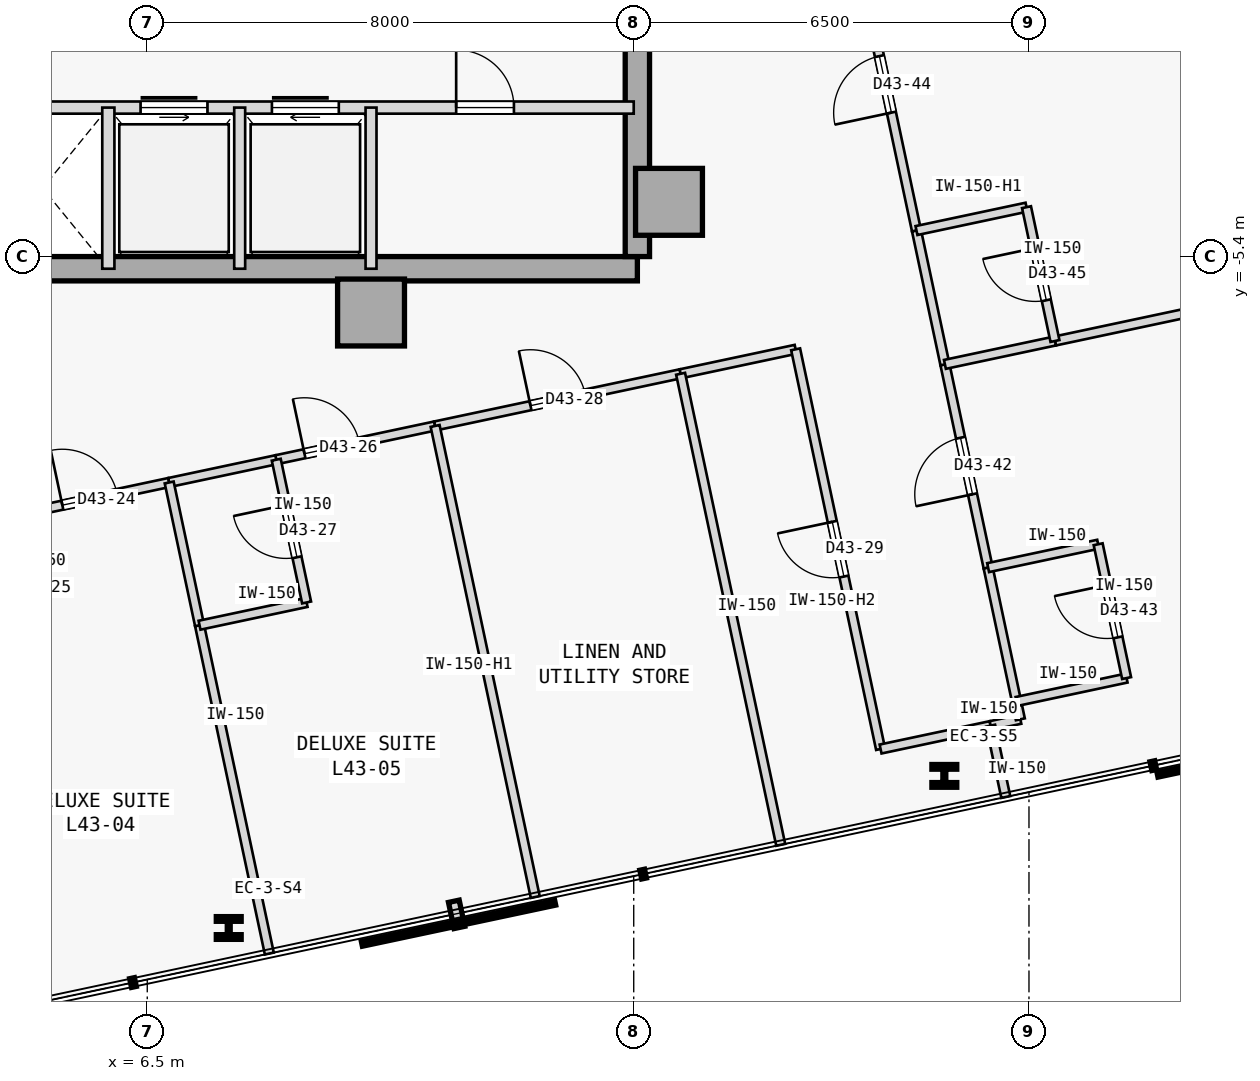
"""IFC4 building model, lengths in metres.
Left out: names, types, materials, properties, quantities, classifications, styles, units other than length and angle.
Written with IfcOpenShell. Run it as: python <this file> out.ifc"""

import sys

from ifc_helpers import new_model, si_unit, direction, frame, frame_2d, origin, origin_2d, place, context, subcontext, project, spatial, rectangle, i_section, extrude, element, fill, save


model = new_model("IFC4")
c1 = context("Model", 3, precision=1e-05, world=origin(), true_north=direction((0.0, 1.0)))
c2 = subcontext(c1, "Body", "Model", "MODEL_VIEW")
j1 = project(units=[si_unit("LENGTHUNIT", "METRE"), si_unit("PLANEANGLEUNIT", "RADIAN")], contexts=[c1])
p1 = place(None, origin())
s1 = spatial("IfcSite", under=j1, at=p1, CompositionType="ELEMENT")
p2 = place(p1, origin())
s2 = spatial("IfcBuilding", under=s1, at=p2, CompositionType="ELEMENT")
p3 = place(p2, frame((0.0, 0.0, 168.4)))
s3 = spatial("IfcBuildingStorey", under=s2, at=p3, CompositionType="ELEMENT", Elevation=168.4)
for number, where, z_axis, x_axis in (
    (1, (15.08, -4.5, 0.0), (0.0, 0.0, 1.0), (1.0, 0.0, 0.0)),
    (2, (10.18, -6.32, 0.0), (0.0, 0.0, 1.0), (1.0, 0.0, 0.0)),
):
    element("IfcColumn", number, at=place(p3, frame(where, z_axis=z_axis, x_axis=x_axis)), inside=s3, PredefinedType="COLUMN", context=c2, shape_type="SweptSolid", body=[
        extrude(rectangle(XDim=1.1, YDim=1.1, at=origin_2d()), origin(), (0.0, 0.0, 1.0), 3.4),
    ])
p4 = place(p3, frame((3.7, -5.6, 0.0), z_axis=(0.0, 0.0, 1.0), x_axis=(1.0, 0.0, 0.0)))
e3 = element("IfcWall", 3, at=p4, inside=s3, PredefinedType="SHEAR", context=c2, shape_type="SweptSolid", body=[
    extrude(rectangle(XDim=10.86, YDim=0.4, at=frame_2d((5.43, 0.0))), origin(), (0.0, 0.0, 1.0), 3.175),
])
p5 = place(p3, frame((14.56, -5.4, 0.0), z_axis=(0.0, 0.0, 1.0), x_axis=(0.0, 1.0, 0.0)))
e4 = element("IfcWall", 4, at=p5, inside=s3, PredefinedType="SHEAR", context=c2, shape_type="SweptSolid", body=[
    extrude(rectangle(XDim=10.8, YDim=0.4, at=frame_2d((5.4, 0.0))), origin(), (0.0, 0.0, 1.0), 3.175),
])
for number, where, z_axis, x_axis in (
    (5, (7.84, -16.441, 0.0), (0.0, 0.0, 1.0), (1.0, 0.0, 0.0)),
    (6, (19.608, -13.94, 0.0), (0.0, 0.0, 1.0), (1.0, 0.0, 0.0)),
):
    element("IfcColumn", number, at=place(p3, frame(where, z_axis=z_axis, x_axis=x_axis)), inside=s3, PredefinedType="COLUMN", context=c2, shape_type="SweptSolid", body=[
        extrude(i_section(OverallWidth=0.409, OverallDepth=0.374, WebThickness=0.048, FlangeThickness=0.077, FilletRadius=0.015, at=origin_2d()), origin(), (0.0, 0.0, 1.0), 3.4),
    ])
p6 = place(p3, frame((3.7, -2.95, 0.0), z_axis=(0.0, 0.0, 1.0), x_axis=(1.0, 0.0, 0.0)))
e7 = element("IfcWall", 7, at=p6, inside=s3, PredefinedType="STANDARD", context=c2, shape_type="SweptSolid", body=[
    extrude(rectangle(XDim=10.8, YDim=0.2, at=frame_2d((5.4, 0.0))), origin(), (0.0, 0.0, 1.0), 3.175),
])
p7 = place(p6, frame((2.69, 0.0, 0.0)))
e8 = element("IfcOpeningElement", 8, at=p7, cuts=e7, PredefinedType="OPENING", context=c2, shape_type="SweptSolid", body=[
    extrude(rectangle(XDim=1.1, YDim=2.15, at=frame_2d((0.55, 1.075))), frame((0.0, 0.11, 0.0), z_axis=(0.0, -1.0, 0.0), x_axis=(1.0, 0.0, 0.0)), (0.0, 0.0, 1.0), 0.22),
])
p8 = place(p6, frame((4.85, 0.0, 0.0)))
e9 = element("IfcOpeningElement", 9, at=p8, cuts=e7, PredefinedType="OPENING", context=c2, shape_type="SweptSolid", body=[
    extrude(rectangle(XDim=1.1, YDim=2.15, at=frame_2d((0.55, 1.075))), frame((0.0, 0.11, 0.0), z_axis=(0.0, -1.0, 0.0), x_axis=(1.0, 0.0, 0.0)), (0.0, 0.0, 1.0), 0.22),
])
p9 = place(p6, frame((7.88, 0.0, 0.0)))
e10 = element("IfcOpeningElement", 10, at=p9, cuts=e7, PredefinedType="OPENING", context=c2, shape_type="SweptSolid", body=[
    extrude(rectangle(XDim=0.95, YDim=2.15, at=frame_2d((0.475, 1.075))), frame((0.0, 0.11, 0.0), z_axis=(0.0, -1.0, 0.0), x_axis=(1.0, 0.0, 0.0)), (0.0, 0.0, 1.0), 0.22),
])
p10 = place(p3, frame((5.86, -5.6, 0.0), z_axis=(0.0, 0.0, 1.0), x_axis=(0.0, 1.0, 0.0)))
e11 = element("IfcWall", 11, at=p10, inside=s3, PredefinedType="STANDARD", context=c2, shape_type="SweptSolid", body=[
    extrude(rectangle(XDim=2.65, YDim=0.2, at=frame_2d((1.325, 0.0))), origin(), (0.0, 0.0, 1.0), 3.175),
])
for number, where, z_axis, x_axis in (
    (12, (10.18, -5.6, 0.0), (0.0, 0.0, 1.0), (0.0, 1.0, 0.0)),
    (13, (8.02, -5.6, 0.0), (0.0, 0.0, 1.0), (0.0, 1.0, 0.0)),
):
    element("IfcWall", number, at=place(p3, frame(where, z_axis=z_axis, x_axis=x_axis)), inside=s3, PredefinedType="STANDARD", context=c2, shape_type="SweptSolid", body=[
        extrude(rectangle(XDim=2.65, YDim=0.18, at=frame_2d((1.325, 0.0))), origin(), (0.0, 0.0, 1.0), 3.175),
    ])
p11 = place(p3, frame((4.247, -9.67, 0.0), z_axis=(0.0, 0.0, 1.0), x_axis=(0.978155367406, 0.207875148141, 0.0)))
e14 = element("IfcWall", 14, at=p11, inside=s3, PredefinedType="PARTITIONING", context=c2, shape_type="SweptSolid", body=[
    extrude(rectangle(XDim=2.672, YDim=0.15, at=frame_2d((1.336, 0.0))), origin(), (0.0, 0.0, 1.0), 3.175),
])
p12 = place(p11, frame((0.876, 0.0, 0.0)))
e15 = element("IfcOpeningElement", 15, at=p12, cuts=e14, PredefinedType="OPENING", context=c2, shape_type="SweptSolid", body=[
    extrude(rectangle(XDim=0.92, YDim=2.15, at=frame_2d((0.46, 1.075))), frame((0.0, 0.085, 0.0), z_axis=(0.0, -1.0, 0.0), x_axis=(1.0, 0.0, 0.0)), (0.0, 0.0, 1.0), 0.17),
])
p13 = place(p3, frame((8.621, -8.741, 0.0), z_axis=(0.0, 0.0, 1.0), x_axis=(0.978139565144, 0.207949491702, 0.0)))
e16 = element("IfcWall", 16, at=p13, inside=s3, PredefinedType="PARTITIONING", context=c2, shape_type="SweptSolid", body=[
    extrude(rectangle(XDim=2.671, YDim=0.15, at=frame_2d((1.335, 0.0))), origin(), (0.0, 0.0, 1.0), 3.175),
])
p14 = place(p13, frame((0.475, 0.0, 0.0)))
e17 = element("IfcOpeningElement", 17, at=p14, cuts=e16, PredefinedType="OPENING", context=c2, shape_type="SweptSolid", body=[
    extrude(rectangle(XDim=0.92, YDim=2.15, at=frame_2d((0.46, 1.075))), frame((0.0, 0.085, 0.0), z_axis=(0.0, -1.0, 0.0), x_axis=(1.0, 0.0, 0.0)), (0.0, 0.0, 1.0), 0.17),
])
p15 = place(p3, frame((6.861, -9.115, 0.0), z_axis=(0.0, 0.0, 1.0), x_axis=(0.978146440129, 0.207917150959, 0.0)))
e18 = element("IfcWall", 18, at=p15, inside=s3, PredefinedType="PARTITIONING", context=c2, shape_type="SweptSolid", body=[
    extrude(rectangle(XDim=1.8, YDim=0.15, at=frame_2d((0.9, 0.0))), origin(), (0.0, 0.0, 1.0), 3.175),
])
p16 = place(p3, frame((11.234, -8.185, 0.0), z_axis=(0.0, 0.0, 1.0), x_axis=(0.978155092113, 0.207876443525, 0.0)))
e19 = element("IfcWall", 19, at=p16, inside=s3, PredefinedType="PARTITIONING", context=c2, shape_type="SweptSolid", body=[
    extrude(rectangle(XDim=4.127, YDim=0.15, at=frame_2d((2.063, 0.0))), origin(), (0.0, 0.0, 1.0), 3.175),
])
p17 = place(p16, frame((1.604, 0.0, 0.0)))
e20 = element("IfcOpeningElement", 20, at=p17, cuts=e19, PredefinedType="OPENING", context=c2, shape_type="SweptSolid", body=[
    extrude(rectangle(XDim=0.92, YDim=2.15, at=frame_2d((0.46, 1.075))), frame((0.0, 0.085, 0.0), z_axis=(0.0, -1.0, 0.0), x_axis=(1.0, 0.0, 0.0)), (0.0, 0.0, 1.0), 0.17),
])
p18 = place(p3, frame((15.271, -7.327, 0.0), z_axis=(0.0, 0.0, 1.0), x_axis=(0.978150188204, 0.207899517354, 0.0)))
e21 = element("IfcWall", 21, at=p18, inside=s3, PredefinedType="PARTITIONING", context=c2, shape_type="SweptSolid", body=[
    extrude(rectangle(XDim=1.934, YDim=0.15, at=frame_2d((0.967, 0.0))), origin(), (0.0, 0.0, 1.0), 3.175),
])
p19 = place(p3, frame((18.56, -13.498, 0.0), z_axis=(0.0, 0.0, 1.0), x_axis=(-0.207888737749, 0.978152479278, 0.0)))
e22 = element("IfcWall", 22, at=p19, inside=s3, PredefinedType="PARTITIONING", context=c2, shape_type="SweptSolid", body=[
    extrude(rectangle(XDim=6.72, YDim=0.15, at=frame_2d((3.36, 0.0))), origin(), (0.0, 0.0, 1.0), 2.575),
])
p20 = place(p19, frame((2.9, 0.0, 0.0)))
e23 = element("IfcOpeningElement", 23, at=p20, cuts=e22, PredefinedType="OPENING", context=c2, shape_type="SweptSolid", body=[
    extrude(rectangle(XDim=0.92, YDim=2.15, at=frame_2d((0.46, 1.075))), frame((0.0, 0.085, 0.0), z_axis=(0.0, -1.0, 0.0), x_axis=(1.0, 0.0, 0.0)), (0.0, 0.0, 1.0), 0.17),
])
p21 = place(p3, frame((18.56, -13.498, 0.0), z_axis=(0.0, 0.0, 1.0), x_axis=(0.978160192495, 0.207852442415, 0.0)))
e24 = element("IfcWall", 24, at=p21, inside=s3, PredefinedType="PARTITIONING", context=c2, shape_type="SweptSolid", body=[
    extrude(rectangle(XDim=1.85, YDim=0.15, at=frame_2d((0.925, 0.0))), origin(), (0.0, 0.0, 1.0), 3.175),
])
p22 = place(p3, frame((20.369, -13.114, 0.0), z_axis=(0.0, 0.0, 1.0), x_axis=(0.978143962546, 0.207928806409, 0.0)))
e25 = element("IfcWall", 25, at=p22, inside=s3, PredefinedType="PARTITIONING", context=c2, shape_type="SweptSolid", body=[
    extrude(rectangle(XDim=0.5, YDim=0.15, at=frame_2d((0.25, 0.0))), origin(), (0.0, 0.0, 1.0), 3.175),
])
p23 = place(p3, frame((20.858, -13.01, 0.0), z_axis=(0.0, 0.0, 1.0), x_axis=(-0.208306395052, 0.978063620518, 0.0)))
e26 = element("IfcWall", 26, at=p23, inside=s3, PredefinedType="PARTITIONING", context=c2, shape_type="SweptSolid", body=[
    extrude(rectangle(XDim=0.3, YDim=0.15, at=frame_2d((0.15, 0.0))), origin(), (0.0, 0.0, 1.0), 3.175),
])
p24 = place(p3, frame((20.328, -10.515, 0.0), z_axis=(0.0, 0.0, 1.0), x_axis=(-0.207918572776, 0.978146137903, 0.0)))
e27 = element("IfcWall", 27, at=p24, inside=s3, PredefinedType="PARTITIONING", context=c2, shape_type="SweptSolid", body=[
    extrude(rectangle(XDim=3.417, YDim=0.15, at=frame_2d((1.708, 0.0))), origin(), (0.0, 0.0, 1.0), 3.175),
])
p25 = place(p24, frame((1.233, 0.0, 0.0)))
e28 = element("IfcOpeningElement", 28, at=p25, cuts=e27, PredefinedType="OPENING", context=c2, shape_type="SweptSolid", body=[
    extrude(rectangle(XDim=0.95, YDim=2.15, at=frame_2d((0.475, 1.075))), frame((0.0, 0.085, 0.0), z_axis=(0.0, -1.0, 0.0), x_axis=(1.0, 0.0, 0.0)), (0.0, 0.0, 1.0), 0.17),
])
p26 = place(p3, frame((20.796, -12.716, 0.0), z_axis=(0.0, 0.0, 1.0), x_axis=(-0.207891197838, 0.978151956427, 0.0)))
e29 = element("IfcWall", 29, at=p26, inside=s3, PredefinedType="PARTITIONING", context=c2, shape_type="SweptSolid", body=[
    extrude(rectangle(XDim=2.25, YDim=0.15, at=frame_2d((1.125, 0.0))), origin(), (0.0, 0.0, 1.0), 3.175),
])
p27 = place(p3, frame((19.15, -4.972, 0.0), z_axis=(0.0, 0.0, 1.0), x_axis=(-0.207934781332, 0.978142692409, 0.0)))
e30 = element("IfcWall", 30, at=p27, inside=s3, PredefinedType="PARTITIONING", context=c2, shape_type="SweptSolid", body=[
    extrude(rectangle(XDim=4.916, YDim=0.15, at=frame_2d((2.458, 0.0))), origin(), (0.0, 0.0, 1.0), 3.175),
])
p28 = place(p27, frame((1.983, 0.0, 0.0)))
e31 = element("IfcOpeningElement", 31, at=p28, cuts=e30, PredefinedType="OPENING", context=c2, shape_type="SweptSolid", body=[
    extrude(rectangle(XDim=0.95, YDim=2.15, at=frame_2d((0.475, 1.075))), frame((0.0, 0.085, 0.0), z_axis=(0.0, -1.0, 0.0), x_axis=(1.0, 0.0, 0.0)), (0.0, 0.0, 1.0), 0.17),
])
p29 = place(p3, frame((19.618, -7.173, 0.0), z_axis=(0.0, 0.0, 1.0), x_axis=(-0.207913264065, 0.978147266328, 0.0)))
e32 = element("IfcWall", 32, at=p29, inside=s3, PredefinedType="PARTITIONING", context=c2, shape_type="SweptSolid", body=[
    extrude(rectangle(XDim=2.25, YDim=0.15, at=frame_2d((1.125, 0.0))), origin(), (0.0, 0.0, 1.0), 3.175),
])
p30 = place(p3, frame((8.507, -16.862, 0.0), z_axis=(0.0, 0.0, 1.0), x_axis=(-0.20791588359, 0.978146709523, 0.0)))
e33 = element("IfcWall", 33, at=p30, inside=s3, PredefinedType="PARTITIONING", context=c2, shape_type="SweptSolid", body=[
    extrude(rectangle(XDim=5.52, YDim=0.15, at=frame_2d((2.76, 0.0))), origin(), (0.0, 0.0, 1.0), 3.175),
])
p31 = place(p3, frame((7.36, -11.462, 0.0), z_axis=(0.0, 0.0, 1.0), x_axis=(-0.207937840262, 0.978142042133, 0.0)))
e34 = element("IfcWall", 34, at=p31, inside=s3, PredefinedType="PARTITIONING", context=c2, shape_type="SweptSolid", body=[
    extrude(rectangle(XDim=2.4, YDim=0.15, at=frame_2d((1.2, 0.0))), origin(), (0.0, 0.0, 1.0), 3.175),
])
p32 = place(p3, frame((7.36, -11.462, 0.0), z_axis=(0.0, 0.0, 1.0), x_axis=(0.978174015353, 0.207787380965, 0.0)))
e35 = element("IfcWall", 35, at=p32, inside=s3, PredefinedType="PARTITIONING", context=c2, shape_type="SweptSolid", body=[
    extrude(rectangle(XDim=1.8, YDim=0.15, at=frame_2d((0.9, 0.0))), origin(), (0.0, 0.0, 1.0), 3.175),
])
p33 = place(p3, frame((9.12, -11.088, 0.0), z_axis=(0.0, 0.0, 1.0), x_axis=(-0.207917150959, 0.978146440129, 0.0)))
e36 = element("IfcWall", 36, at=p33, inside=s3, PredefinedType="PARTITIONING", context=c2, shape_type="SweptSolid", body=[
    extrude(rectangle(XDim=2.4, YDim=0.15, at=frame_2d((1.2, 0.0))), origin(), (0.0, 0.0, 1.0), 3.175),
])
p34 = place(p33, frame((0.76, 0.0, 0.0)))
e37 = element("IfcOpeningElement", 37, at=p34, cuts=e36, PredefinedType="OPENING", context=c2, shape_type="SweptSolid", body=[
    extrude(rectangle(XDim=0.88, YDim=2.15, at=frame_2d((0.44, 1.075))), frame((0.0, 0.085, 0.0), z_axis=(0.0, -1.0, 0.0), x_axis=(1.0, 0.0, 0.0)), (0.0, 0.0, 1.0), 0.17),
])
p35 = place(p3, frame((12.881, -15.932, 0.0), z_axis=(0.0, 0.0, 1.0), x_axis=(-0.207916267651, 0.978146627887, 0.0)))
e38 = element("IfcWall", 38, at=p35, inside=s3, PredefinedType="PARTITIONING", context=c2, shape_type="SweptSolid", body=[
    extrude(rectangle(XDim=7.92, YDim=0.15, at=frame_2d((3.96, 0.0))), origin(), (0.0, 0.0, 1.0), 2.725),
])
p36 = place(p3, frame((16.917, -15.074, 0.0), z_axis=(0.0, 0.0, 1.0), x_axis=(-0.207922536845, 0.978145295277, 0.0)))
e39 = element("IfcWall", 39, at=p36, inside=s3, PredefinedType="PARTITIONING", context=c2, shape_type="SweptSolid", body=[
    extrude(rectangle(XDim=7.92, YDim=0.15, at=frame_2d((3.96, 0.0))), origin(), (0.0, 0.0, 1.0), 3.175),
])
p37 = place(p3, frame((20.619, -14.288, 0.0), z_axis=(0.0, 0.0, 1.0), x_axis=(-0.207917150959, 0.978146440129, 0.0)))
e40 = element("IfcWall", 40, at=p37, inside=s3, PredefinedType="PARTITIONING", context=c2, shape_type="SweptSolid", body=[
    extrude(rectangle(XDim=1.2, YDim=0.15, at=frame_2d((0.6, 0.0))), origin(), (0.0, 0.0, 1.0), 3.175),
])
for number, where, z_axis, x_axis in (
    (41, (20.796, -12.716, 0.0), (0.0, 0.0, 1.0), (0.978, 0.208, 0.0)),
    (42, (20.328, -10.515, 0.0), (0.0, 0.0, 1.0), (0.978, 0.208, 0.0)),
):
    element("IfcWall", number, at=place(p3, frame(where, z_axis=z_axis, x_axis=x_axis)), inside=s3, PredefinedType="PARTITIONING", context=c2, shape_type="SweptSolid", body=[
        extrude(rectangle(XDim=1.85, YDim=0.15, at=frame_2d((0.925, 0.0))), origin(), (0.0, 0.0, 1.0), 3.175),
    ])
p38 = place(p3, frame((22.605, -12.332, 0.0), z_axis=(0.0, 0.0, 1.0), x_axis=(-0.207891197838, 0.978151956427, 0.0)))
e43 = element("IfcWall", 43, at=p38, inside=s3, PredefinedType="PARTITIONING", context=c2, shape_type="SweptSolid", body=[
    extrude(rectangle(XDim=2.25, YDim=0.15, at=frame_2d((1.125, 0.0))), origin(), (0.0, 0.0, 1.0), 3.175),
])
p39 = place(p38, frame((0.685, 0.0, 0.0)))
e44 = element("IfcOpeningElement", 44, at=p39, cuts=e43, PredefinedType="OPENING", context=c2, shape_type="SweptSolid", body=[
    extrude(rectangle(XDim=0.88, YDim=2.15, at=frame_2d((0.44, 1.075))), frame((0.0, 0.085, 0.0), z_axis=(0.0, -1.0, 0.0), x_axis=(1.0, 0.0, 0.0)), (0.0, 0.0, 1.0), 0.17),
])
p40 = place(p3, frame((21.427, -6.789, 0.0), z_axis=(0.0, 0.0, 1.0), x_axis=(0.97814556055, 0.207921288896, 0.0)))
e45 = element("IfcWall", 45, at=p40, inside=s3, PredefinedType="PARTITIONING", context=c2, shape_type="SweptSolid", body=[
    extrude(rectangle(XDim=12.187, YDim=0.15, at=frame_2d((6.094, 0.0))), origin(), (0.0, 0.0, 1.0), 2.725),
])
p41 = place(p3, frame((19.618, -7.173, 0.0), z_axis=(0.0, 0.0, 1.0), x_axis=(0.978160192495, 0.207852442415, 0.0)))
e46 = element("IfcWall", 46, at=p41, inside=s3, PredefinedType="PARTITIONING", context=c2, shape_type="SweptSolid", body=[
    extrude(rectangle(XDim=1.85, YDim=0.15, at=frame_2d((0.925, 0.0))), origin(), (0.0, 0.0, 1.0), 3.175),
])
p42 = place(p3, frame((19.15, -4.972, 0.0), z_axis=(0.0, 0.0, 1.0), x_axis=(0.978133353907, 0.20797870558, 0.0)))
e47 = element("IfcWall", 47, at=p42, inside=s3, PredefinedType="PARTITIONING", context=c2, shape_type="SweptSolid", body=[
    extrude(rectangle(XDim=1.85, YDim=0.15, at=frame_2d((0.925, 0.0))), origin(), (0.0, 0.0, 1.0), 2.725),
])
p43 = place(p3, frame((21.427, -6.789, 0.0), z_axis=(0.0, 0.0, 1.0), x_axis=(-0.207891197838, 0.978151956427, 0.0)))
e48 = element("IfcWall", 48, at=p43, inside=s3, PredefinedType="PARTITIONING", context=c2, shape_type="SweptSolid", body=[
    extrude(rectangle(XDim=2.25, YDim=0.15, at=frame_2d((1.125, 0.0))), origin(), (0.0, 0.0, 1.0), 3.175),
])
p44 = place(p43, frame((0.685, 0.0, 0.0)))
e49 = element("IfcOpeningElement", 49, at=p44, cuts=e48, PredefinedType="OPENING", context=c2, shape_type="SweptSolid", body=[
    extrude(rectangle(XDim=0.88, YDim=2.15, at=frame_2d((0.44, 1.075))), frame((0.0, 0.085, 0.0), z_axis=(0.0, -1.0, 0.0), x_axis=(1.0, 0.0, 0.0)), (0.0, 0.0, 1.0), 0.17),
])
p45 = place(p7, origin())
e50 = element("IfcDoor", 50, at=p45, inside=s3, OperationType="SLIDING_TO_LEFT", PredefinedType="DOOR", context=c2, shape_type="SweptSolid", body=[
    extrude(rectangle(XDim=1.1, YDim=2.15, at=frame_2d((0.55, 1.075))), frame((0.0, 0.025, 0.0), z_axis=(0.0, -1.0, 0.0), x_axis=(1.0, 0.0, 0.0)), (0.0, 0.0, 1.0), 0.05),
])
fill(e8, e50)
p46 = place(p8, origin())
e51 = element("IfcDoor", 51, at=p46, inside=s3, OperationType="SLIDING_TO_RIGHT", PredefinedType="DOOR", context=c2, shape_type="SweptSolid", body=[
    extrude(rectangle(XDim=1.1, YDim=2.15, at=frame_2d((0.55, 1.075))), frame((0.0, 0.025, 0.0), z_axis=(0.0, -1.0, 0.0), x_axis=(1.0, 0.0, 0.0)), (0.0, 0.0, 1.0), 0.05),
])
fill(e9, e51)
p47 = place(p9, origin())
e52 = element("IfcDoor", 52, at=p47, inside=s3, OperationType="SINGLE_SWING_LEFT", PredefinedType="DOOR", context=c2, shape_type="SweptSolid", body=[
    extrude(rectangle(XDim=0.95, YDim=2.15, at=frame_2d((0.475, 1.075))), frame((0.0, 0.025, 0.0), z_axis=(0.0, -1.0, 0.0), x_axis=(1.0, 0.0, 0.0)), (0.0, 0.0, 1.0), 0.05),
])
fill(e10, e52)
p48 = place(p12, origin())
e53 = element("IfcDoor", 53, at=p48, inside=s3, OperationType="SINGLE_SWING_LEFT", PredefinedType="DOOR", context=c2, shape_type="SweptSolid", body=[
    extrude(rectangle(XDim=0.92, YDim=2.15, at=frame_2d((0.46, 1.075))), frame((0.0, 0.025, 0.0), z_axis=(0.0, -1.0, 0.0), x_axis=(1.0, 0.0, 0.0)), (0.0, 0.0, 1.0), 0.05),
])
fill(e15, e53)
p49 = place(p14, origin())
e54 = element("IfcDoor", 54, at=p49, inside=s3, OperationType="SINGLE_SWING_LEFT", PredefinedType="DOOR", context=c2, shape_type="SweptSolid", body=[
    extrude(rectangle(XDim=0.92, YDim=2.15, at=frame_2d((0.46, 1.075))), frame((0.0, 0.025, 0.0), z_axis=(0.0, -1.0, 0.0), x_axis=(1.0, 0.0, 0.0)), (0.0, 0.0, 1.0), 0.05),
])
fill(e17, e54)
p50 = place(p34, origin())
e55 = element("IfcDoor", 55, at=p50, inside=s3, OperationType="SINGLE_SWING_RIGHT", PredefinedType="DOOR", context=c2, shape_type="SweptSolid", body=[
    extrude(rectangle(XDim=0.88, YDim=2.15, at=frame_2d((0.44, 1.075))), frame((0.0, 0.025, 0.0), z_axis=(0.0, -1.0, 0.0), x_axis=(1.0, 0.0, 0.0)), (0.0, 0.0, 1.0), 0.05),
])
fill(e37, e55)
p51 = place(p17, origin())
e56 = element("IfcDoor", 56, at=p51, inside=s3, OperationType="SINGLE_SWING_LEFT", PredefinedType="DOOR", context=c2, shape_type="SweptSolid", body=[
    extrude(rectangle(XDim=0.92, YDim=2.15, at=frame_2d((0.46, 1.075))), frame((0.0, 0.025, 0.0), z_axis=(0.0, -1.0, 0.0), x_axis=(1.0, 0.0, 0.0)), (0.0, 0.0, 1.0), 0.05),
])
fill(e20, e56)
p52 = place(p20, origin())
e57 = element("IfcDoor", 57, at=p52, inside=s3, OperationType="SINGLE_SWING_RIGHT", PredefinedType="DOOR", context=c2, shape_type="SweptSolid", body=[
    extrude(rectangle(XDim=0.92, YDim=2.15, at=frame_2d((0.46, 1.075))), frame((0.0, 0.025, 0.0), z_axis=(0.0, -1.0, 0.0), x_axis=(1.0, 0.0, 0.0)), (0.0, 0.0, 1.0), 0.05),
])
fill(e23, e57)
p53 = place(p25, origin())
e58 = element("IfcDoor", 58, at=p53, inside=s3, OperationType="SINGLE_SWING_LEFT", PredefinedType="DOOR", context=c2, shape_type="SweptSolid", body=[
    extrude(rectangle(XDim=0.95, YDim=2.15, at=frame_2d((0.475, 1.075))), frame((0.0, 0.025, 0.0), z_axis=(0.0, -1.0, 0.0), x_axis=(1.0, 0.0, 0.0)), (0.0, 0.0, 1.0), 0.05),
])
fill(e28, e58)
p54 = place(p39, origin())
e59 = element("IfcDoor", 59, at=p54, inside=s3, OperationType="SINGLE_SWING_RIGHT", PredefinedType="DOOR", context=c2, shape_type="SweptSolid", body=[
    extrude(rectangle(XDim=0.88, YDim=2.15, at=frame_2d((0.44, 1.075))), frame((0.0, 0.025, 0.0), z_axis=(0.0, -1.0, 0.0), x_axis=(1.0, 0.0, 0.0)), (0.0, 0.0, 1.0), 0.05),
])
fill(e44, e59)
p55 = place(p28, origin())
e60 = element("IfcDoor", 60, at=p55, inside=s3, OperationType="SINGLE_SWING_LEFT", PredefinedType="DOOR", context=c2, shape_type="SweptSolid", body=[
    extrude(rectangle(XDim=0.95, YDim=2.15, at=frame_2d((0.475, 1.075))), frame((0.0, 0.025, 0.0), z_axis=(0.0, -1.0, 0.0), x_axis=(1.0, 0.0, 0.0)), (0.0, 0.0, 1.0), 0.05),
])
fill(e31, e60)
p56 = place(p44, origin())
e61 = element("IfcDoor", 61, at=p56, inside=s3, OperationType="SINGLE_SWING_RIGHT", PredefinedType="DOOR", context=c2, shape_type="SweptSolid", body=[
    extrude(rectangle(XDim=0.88, YDim=2.15, at=frame_2d((0.44, 1.075))), frame((0.0, 0.025, 0.0), z_axis=(0.0, -1.0, 0.0), x_axis=(1.0, 0.0, 0.0)), (0.0, 0.0, 1.0), 0.05),
])
fill(e49, e61)
save(model, sys.argv[1])
